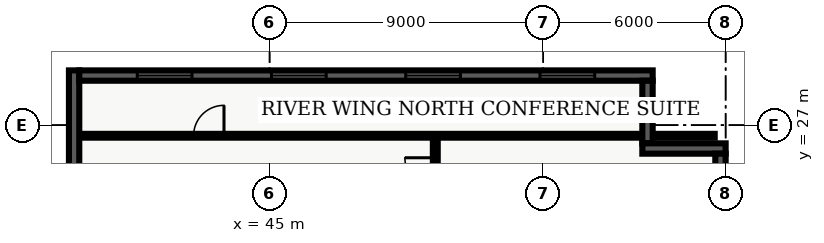
"""IFC4 building model, lengths in metres.
Left out: names, types, materials, properties, quantities, classifications, styles, units other than length and angle.
Written with IfcOpenShell. Run it as: python <this file> out.ifc"""

import sys

from ifc_helpers import new_model, entity, si_unit, converted_unit, direction, frame, origin_with_axes, origin_2d_with_axis, place, context, subcontext, project, spatial, polyline, rectangle, outline, extrude, element, fill, save


model = new_model("IFC4")
c1 = context("Model", 3, precision=1e-05, world=origin_with_axes(), true_north=direction((0.0, 1.0)))
c2 = subcontext(c1, "Body", "Model", "MODEL_VIEW")
j1 = project(units=[si_unit("LENGTHUNIT", "METRE"), converted_unit("PLANEANGLEUNIT", "DEGREE", entity("IfcPlaneAngleMeasure", 0.017), si_unit("PLANEANGLEUNIT", "RADIAN"), dimensions=[0, 0, 0, 0, 0, 0, 0])], contexts=[c1])
p1 = place(None, origin_with_axes())
s1 = spatial("IfcSite", under=j1, at=p1, CompositionType="ELEMENT")
p2 = place(p1, origin_with_axes())
s2 = spatial("IfcBuilding", under=s1, at=p2, CompositionType="ELEMENT")
p3 = place(p2, frame((0.0, 0.0, 204.3), z_axis=(0.0, 0.0, 1.0), x_axis=(1.0, 0.0, 0.0)))
s3 = spatial("IfcBuildingStorey", under=s2, at=p3, CompositionType="ELEMENT", Elevation=204.3)
p4 = place(p3, frame((50.45, 7.85, 0.0), z_axis=(0.0, 0.0, 1.0), x_axis=(0.0, 1.0, 0.0)))
e1 = element("IfcWall", 1, at=p4, inside=s3, PredefinedType="PARTITIONING", context=c2, shape_type="SweptSolid", body=[
    extrude(outline(polyline([(0.0, -0.08), (18.8, -0.08), (18.8, 0.08), (0.0, 0.08), (0.0, -0.08)])), origin_with_axes(), (0.0, 0.0, 1.0), 2.7),
])
p5 = place(p4, frame((0.987, 0.0, 0.0), z_axis=(0.0, 0.0, 1.0), x_axis=(1.0, 0.0, 0.0)))
e2 = element("IfcOpeningElement", 2, at=p5, cuts=e1, PredefinedType="OPENING", context=c2, shape_type="SweptSolid", body=[
    extrude(rectangle(XDim=0.9, YDim=0.18, at=origin_2d_with_axis()), origin_with_axes(), (0.0, 0.0, 1.0), 2.15),
])
p6 = place(p4, frame((6.94, 0.0, 0.0), z_axis=(0.0, 0.0, 1.0), x_axis=(1.0, 0.0, 0.0)))
e3 = element("IfcOpeningElement", 3, at=p6, cuts=e1, PredefinedType="OPENING", context=c2, shape_type="SweptSolid", body=[
    extrude(rectangle(XDim=1.0, YDim=0.18, at=origin_2d_with_axis()), origin_with_axes(), (0.0, 0.0, 1.0), 2.15),
])
p7 = place(p4, frame((12.38, 0.0, 0.0), z_axis=(0.0, 0.0, 1.0), x_axis=(1.0, 0.0, 0.0)))
e4 = element("IfcOpeningElement", 4, at=p7, cuts=e1, PredefinedType="OPENING", context=c2, shape_type="SweptSolid", body=[
    extrude(rectangle(XDim=1.0, YDim=0.18, at=origin_2d_with_axis()), origin_with_axes(), (0.0, 0.0, 1.0), 2.15),
])
p8 = place(p4, frame((17.576, 0.0, 0.0), z_axis=(0.0, 0.0, 1.0), x_axis=(1.0, 0.0, 0.0)))
e5 = element("IfcOpeningElement", 5, at=p8, cuts=e1, PredefinedType="OPENING", context=c2, shape_type="SweptSolid", body=[
    extrude(rectangle(XDim=1.0, YDim=0.18, at=origin_2d_with_axis()), origin_with_axes(), (0.0, 0.0, 1.0), 2.15),
])
p9 = place(p3, frame((38.735, 26.65, 0.0), z_axis=(0.0, 0.0, 1.0), x_axis=(1.0, 0.0, 0.0)))
e6 = element("IfcWall", 6, at=p9, inside=s3, PredefinedType="PARTITIONING", context=c2, shape_type="SweptSolid", body=[
    extrude(outline(polyline([(0.0, -0.062), (20.905, -0.062), (20.905, 0.062), (0.0, 0.062), (0.0, -0.062)])), origin_with_axes(), (0.0, 0.0, 1.0), 2.7),
])
p10 = place(p9, frame((4.265, 0.0, 0.0), z_axis=(0.0, 0.0, 1.0), x_axis=(1.0, 0.0, 0.0)))
e7 = element("IfcOpeningElement", 7, at=p10, cuts=e6, PredefinedType="OPENING", context=c2, shape_type="SweptSolid", body=[
    extrude(rectangle(XDim=1.0, YDim=0.145, at=origin_2d_with_axis()), origin_with_axes(), (0.0, 0.0, 1.0), 2.15),
])
p11 = place(p3, frame((38.57, 21.26, 0.0), z_axis=(0.0, 0.0, 1.0), x_axis=(0.0, 1.0, 0.0)))
e8 = element("IfcWall", 8, at=p11, inside=s3, PredefinedType="SOLIDWALL", context=c2, shape_type="SweptSolid", body=[
    extrude(outline(polyline([(0.0, -0.17), (7.54, -0.17), (7.54, 0.17), (0.0, 0.17), (0.0, -0.17)])), origin_with_axes(), (0.0, 0.0, 1.0), 3.66),
])
p12 = place(p3, frame((38.74, 28.63, 0.0), z_axis=(0.0, 0.0, 1.0), x_axis=(1.0, 0.0, 0.0)))
e9 = element("IfcWall", 9, at=p12, inside=s3, PredefinedType="SOLIDWALL", context=c2, shape_type="SweptSolid", body=[
    extrude(outline(polyline([(0.0, -0.17), (18.86, -0.17), (18.86, 0.17), (0.0, 0.17), (0.0, -0.17)])), origin_with_axes(), (0.0, 0.0, 1.0), 3.66),
])
p13 = place(p12, frame((2.808, 0.0, 0.45), z_axis=(0.0, 0.0, 1.0), x_axis=(1.0, 0.0, 0.0)))
e10 = element("IfcOpeningElement", 10, at=p13, cuts=e9, PredefinedType="OPENING", context=c2, shape_type="SweptSolid", body=[
    extrude(rectangle(XDim=1.8, YDim=0.36, at=origin_2d_with_axis()), origin_with_axes(), (0.0, 0.0, 1.0), 2.1),
])
p14 = place(p12, frame((7.222, 0.0, 0.45), z_axis=(0.0, 0.0, 1.0), x_axis=(1.0, 0.0, 0.0)))
e11 = element("IfcOpeningElement", 11, at=p14, cuts=e9, PredefinedType="OPENING", context=c2, shape_type="SweptSolid", body=[
    extrude(rectangle(XDim=1.8, YDim=0.36, at=origin_2d_with_axis()), origin_with_axes(), (0.0, 0.0, 1.0), 2.1),
])
p15 = place(p12, frame((11.637, 0.0, 0.45), z_axis=(0.0, 0.0, 1.0), x_axis=(1.0, 0.0, 0.0)))
e12 = element("IfcOpeningElement", 12, at=p15, cuts=e9, PredefinedType="OPENING", context=c2, shape_type="SweptSolid", body=[
    extrude(rectangle(XDim=1.8, YDim=0.36, at=origin_2d_with_axis()), origin_with_axes(), (0.0, 0.0, 1.0), 2.1),
])
p16 = place(p12, frame((16.053, 0.0, 0.45), z_axis=(0.0, 0.0, 1.0), x_axis=(1.0, 0.0, 0.0)))
e13 = element("IfcOpeningElement", 13, at=p16, cuts=e9, PredefinedType="OPENING", context=c2, shape_type="SweptSolid", body=[
    extrude(rectangle(XDim=1.8, YDim=0.36, at=origin_2d_with_axis()), origin_with_axes(), (0.0, 0.0, 1.0), 2.1),
])
p17 = place(p3, frame((57.43, 28.46, 0.0), z_axis=(0.0, 0.0, 1.0), x_axis=(0.0, -1.0, 0.0)))
e14 = element("IfcWall", 14, at=p17, inside=s3, PredefinedType="SOLIDWALL", context=c2, shape_type="SweptSolid", body=[
    extrude(outline(polyline([(0.0, -0.17), (2.06, -0.17), (2.06, 0.17), (0.0, 0.17), (0.0, -0.17)])), origin_with_axes(), (0.0, 0.0, 1.0), 3.66),
])
p18 = place(p3, frame((57.26, 26.23, 0.0), z_axis=(0.0, 0.0, 1.0), x_axis=(1.0, 0.0, 0.0)))
e15 = element("IfcWall", 15, at=p18, inside=s3, PredefinedType="SOLIDWALL", context=c2, shape_type="SweptSolid", body=[
    extrude(outline(polyline([(0.0, -0.17), (2.74, -0.17), (2.74, 0.17), (0.0, 0.17), (0.0, -0.17)])), origin_with_axes(), (0.0, 0.0, 1.0), 3.66),
])
p19 = place(p3, frame((59.83, 26.06, 0.0), z_axis=(0.0, 0.0, 1.0), x_axis=(0.0, -1.0, 0.0)))
e16 = element("IfcWall", 16, at=p19, inside=s3, PredefinedType="SOLIDWALL", context=c2, shape_type="SweptSolid", body=[
    extrude(outline(polyline([(0.0, -0.17), (23.66, -0.17), (23.66, 0.17), (0.0, 0.17), (0.0, -0.17)])), origin_with_axes(), (0.0, 0.0, 1.0), 3.66),
])
p20 = place(p19, frame((11.83, 0.0, 0.45), z_axis=(0.0, 0.0, 1.0), x_axis=(1.0, 0.0, 0.0)))
e17 = element("IfcOpeningElement", 17, at=p20, cuts=e16, PredefinedType="OPENING", context=c2, shape_type="SweptSolid", body=[
    extrude(rectangle(XDim=1.8, YDim=0.36, at=origin_2d_with_axis()), origin_with_axes(), (0.0, 0.0, 1.0), 2.1),
])
p21 = place(p19, frame((20.364, 0.0, 0.45), z_axis=(0.0, 0.0, 1.0), x_axis=(1.0, 0.0, 0.0)))
e18 = element("IfcOpeningElement", 18, at=p21, cuts=e16, PredefinedType="OPENING", context=c2, shape_type="SweptSolid", body=[
    extrude(rectangle(XDim=1.8, YDim=0.36, at=origin_2d_with_axis()), origin_with_axes(), (0.0, 0.0, 1.0), 2.1),
])
p22 = place(p9, frame((4.265, 0.0, 0.0), z_axis=(0.0, 0.0, 1.0), x_axis=(1.0, 0.0, 0.0)))
e19 = element("IfcDoor", 19, at=p22, inside=s3, OperationType="SINGLE_SWING_RIGHT", PredefinedType="DOOR", context=c2, shape_type="SweptSolid", body=[
    extrude(rectangle(XDim=1.0, YDim=0.075, at=origin_2d_with_axis()), origin_with_axes(), (0.0, 0.0, 1.0), 2.15),
])
fill(e7, e19)
p23 = place(p4, frame((17.576, 0.0, 0.0), z_axis=(0.0, 0.0, 1.0), x_axis=(1.0, 0.0, 0.0)))
e20 = element("IfcDoor", 20, at=p23, inside=s3, OperationType="SINGLE_SWING_RIGHT", PredefinedType="DOOR", context=c2, shape_type="SweptSolid", body=[
    extrude(rectangle(XDim=1.0, YDim=0.09, at=origin_2d_with_axis()), origin_with_axes(), (0.0, 0.0, 1.0), 2.15),
])
fill(e5, e20)
p24 = place(p12, frame((2.808, 0.0, 0.45), z_axis=(0.0, 0.0, 1.0), x_axis=(1.0, 0.0, 0.0)))
e21 = element("IfcWindow", 21, at=p24, inside=s3, PredefinedType="WINDOW", context=c2, shape_type="SweptSolid", body=[
    extrude(rectangle(XDim=1.8, YDim=0.09, at=origin_2d_with_axis()), origin_with_axes(), (0.0, 0.0, 1.0), 2.1),
])
fill(e10, e21)
p25 = place(p12, frame((7.222, 0.0, 0.45), z_axis=(0.0, 0.0, 1.0), x_axis=(1.0, 0.0, 0.0)))
e22 = element("IfcWindow", 22, at=p25, inside=s3, PredefinedType="WINDOW", context=c2, shape_type="SweptSolid", body=[
    extrude(rectangle(XDim=1.8, YDim=0.09, at=origin_2d_with_axis()), origin_with_axes(), (0.0, 0.0, 1.0), 2.1),
])
fill(e11, e22)
p26 = place(p12, frame((11.637, 0.0, 0.45), z_axis=(0.0, 0.0, 1.0), x_axis=(1.0, 0.0, 0.0)))
e23 = element("IfcWindow", 23, at=p26, inside=s3, PredefinedType="WINDOW", context=c2, shape_type="SweptSolid", body=[
    extrude(rectangle(XDim=1.8, YDim=0.09, at=origin_2d_with_axis()), origin_with_axes(), (0.0, 0.0, 1.0), 2.1),
])
fill(e12, e23)
p27 = place(p12, frame((16.053, 0.0, 0.45), z_axis=(0.0, 0.0, 1.0), x_axis=(1.0, 0.0, 0.0)))
e24 = element("IfcWindow", 24, at=p27, inside=s3, PredefinedType="WINDOW", context=c2, shape_type="SweptSolid", body=[
    extrude(rectangle(XDim=1.8, YDim=0.09, at=origin_2d_with_axis()), origin_with_axes(), (0.0, 0.0, 1.0), 2.1),
])
fill(e13, e24)
save(model, sys.argv[1])
